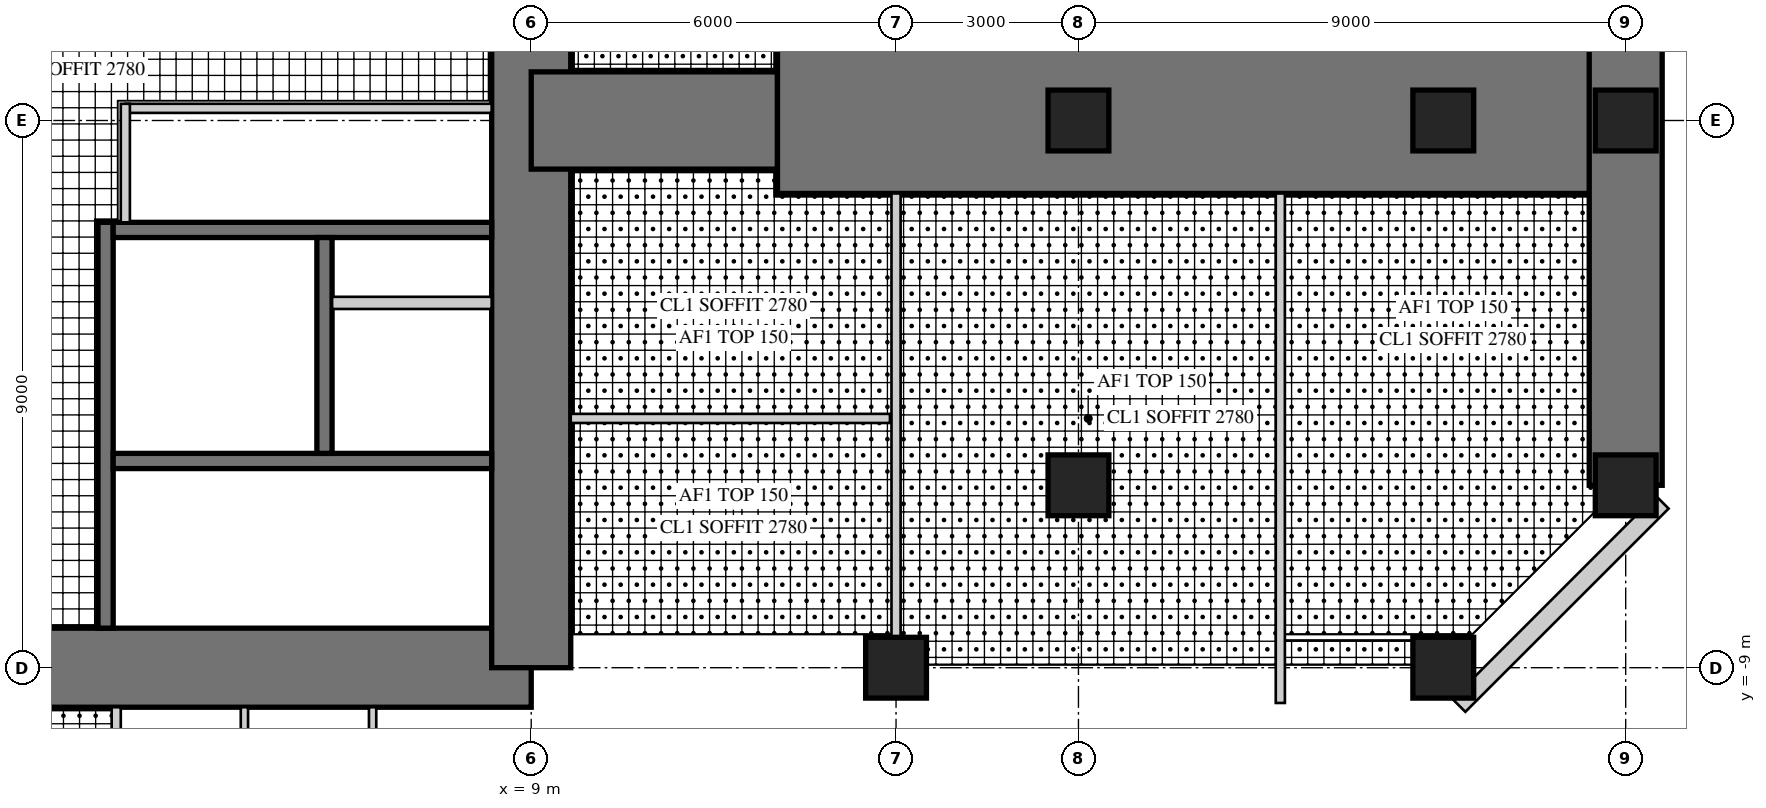
"""IFC4 building model, lengths in metres.
Left out: names, types, materials, properties, quantities, classifications, styles, units other than length and angle.
Written with IfcOpenShell. Run it as: python <this file> out.ifc"""

import sys

from ifc_helpers import new_model, si_unit, direction, frame, frame_2d, origin, origin_2d, place, context, subcontext, project, spatial, rectangle, hollow_rectangle, extrude, element, fill, save


model = new_model("IFC4")
c1 = context("Model", 3, precision=1e-05, world=origin(), true_north=direction((0.0, 1.0)))
c2 = subcontext(c1, "Body", "Model", "MODEL_VIEW")
j1 = project(units=[si_unit("LENGTHUNIT", "METRE"), si_unit("PLANEANGLEUNIT", "RADIAN")], contexts=[c1])
p1 = place(None, origin())
s1 = spatial("IfcSite", under=j1, at=p1, CompositionType="ELEMENT")
p2 = place(p1, origin())
s2 = spatial("IfcBuilding", under=s1, at=p2, CompositionType="ELEMENT")
p3 = place(p2, frame((0.0, 0.0, 152.5)))
s3 = spatial("IfcBuildingStorey", under=s2, at=p3, CompositionType="ELEMENT", Elevation=152.5)
p4 = place(p3, frame((-9.0, -9.0, 0.0), z_axis=(0.0, 0.0, 1.0), x_axis=(1.0, 0.0, 0.0)))
e1 = element("IfcWall", 1, at=p4, inside=s3, PredefinedType="SHEAR", context=c2, shape_type="SweptSolid", body=[
    extrude(rectangle(XDim=18.0, YDim=1.3, at=frame_2d((9.0, 0.0))), origin(), (0.0, 0.0, 1.0), 4.0),
])
p5 = place(p4, frame((9.8, 0.0, 0.0)))
e2 = element("IfcOpeningElement", 2, at=p5, cuts=e1, PredefinedType="OPENING", context=c2, shape_type="SweptSolid", body=[
    extrude(rectangle(XDim=1.0, YDim=2.4, at=frame_2d((0.5, 1.2))), frame((0.0, 0.66, 0.0), z_axis=(0.0, -1.0, 0.0), x_axis=(1.0, 0.0, 0.0)), (0.0, 0.0, 1.0), 1.32),
])
p6 = place(p3, frame((9.0, -9.0, 0.0), z_axis=(0.0, 0.0, 1.0), x_axis=(0.0, 1.0, 0.0)))
e3 = element("IfcWall", 3, at=p6, inside=s3, PredefinedType="SHEAR", context=c2, shape_type="SweptSolid", body=[
    extrude(rectangle(XDim=18.0, YDim=1.3, at=frame_2d((9.0, 0.0))), origin(), (0.0, 0.0, 1.0), 4.0),
])
p7 = place(p6, frame((9.8, 0.0, 0.0)))
e4 = element("IfcOpeningElement", 4, at=p7, cuts=e3, PredefinedType="OPENING", context=c2, shape_type="SweptSolid", body=[
    extrude(rectangle(XDim=1.0, YDim=2.4, at=frame_2d((0.5, 1.2))), frame((0.0, 0.66, 0.0), z_axis=(0.0, -1.0, 0.0), x_axis=(1.0, 0.0, 0.0)), (0.0, 0.0, 1.0), 1.32),
])
p8 = place(p3, frame((2.0, -1.675, 0.0), z_axis=(0.0, 0.0, 1.0), x_axis=(0.0, -1.0, 0.0)))
e5 = element("IfcWall", 5, at=p8, inside=s3, PredefinedType="SHEAR", context=c2, shape_type="SweptSolid", body=[
    extrude(rectangle(XDim=6.675, YDim=0.25, at=frame_2d((3.337, 0.0))), origin(), (0.0, 0.0, 1.0), 4.0),
])
p9 = place(p8, frame((0.725, 0.0, 0.0)))
e6 = element("IfcOpeningElement", 6, at=p9, cuts=e5, PredefinedType="OPENING", context=c2, shape_type="SweptSolid", body=[
    extrude(rectangle(XDim=1.0, YDim=2.1, at=frame_2d((0.5, 1.05))), frame((0.0, 0.135, 0.0), z_axis=(0.0, -1.0, 0.0), x_axis=(1.0, 0.0, 0.0)), (0.0, 0.0, 1.0), 0.27),
])
p10 = place(p3, frame((2.125, -1.8, 0.0), z_axis=(0.0, 0.0, 1.0), x_axis=(1.0, 0.0, 0.0)))
e7 = element("IfcWall", 7, at=p10, inside=s3, PredefinedType="SHEAR", context=c2, shape_type="SweptSolid", body=[
    extrude(rectangle(XDim=6.225, YDim=0.25, at=frame_2d((3.113, 0.0))), origin(), (0.0, 0.0, 1.0), 4.0),
])
p11 = place(p3, frame((2.125, -5.6, 0.0), z_axis=(0.0, 0.0, 1.0), x_axis=(1.0, 0.0, 0.0)))
e8 = element("IfcWall", 8, at=p11, inside=s3, PredefinedType="SHEAR", context=c2, shape_type="SweptSolid", body=[
    extrude(rectangle(XDim=6.225, YDim=0.25, at=frame_2d((3.113, 0.0))), origin(), (0.0, 0.0, 1.0), 4.0),
])
p12 = place(p11, frame((0.175, 0.0, 0.0)))
e9 = element("IfcOpeningElement", 9, at=p12, cuts=e8, PredefinedType="OPENING", context=c2, shape_type="SweptSolid", body=[
    extrude(rectangle(XDim=1.0, YDim=2.1, at=frame_2d((0.5, 1.05))), frame((0.0, 0.135, 0.0), z_axis=(0.0, -1.0, 0.0), x_axis=(1.0, 0.0, 0.0)), (0.0, 0.0, 1.0), 0.27),
])
p13 = place(p3, frame((5.6, -1.925, 0.0), z_axis=(0.0, 0.0, 1.0), x_axis=(0.0, -1.0, 0.0)))
e10 = element("IfcWall", 10, at=p13, inside=s3, PredefinedType="SHEAR", context=c2, shape_type="SweptSolid", body=[
    extrude(rectangle(XDim=3.55, YDim=0.25, at=frame_2d((1.775, 0.0))), origin(), (0.0, 0.0, 1.0), 4.0),
])
p14 = place(p13, frame((1.525, 0.0, 0.0)))
e11 = element("IfcOpeningElement", 11, at=p14, cuts=e10, PredefinedType="OPENING", context=c2, shape_type="SweptSolid", body=[
    extrude(rectangle(XDim=1.1, YDim=2.2, at=frame_2d((0.55, 1.1))), frame((0.0, 0.135, 0.0), z_axis=(0.0, -1.0, 0.0), x_axis=(1.0, 0.0, 0.0)), (0.0, 0.0, 1.0), 0.27),
])
p15 = place(p13, frame((0.075, 0.0, 0.0)))
e12 = element("IfcOpeningElement", 12, at=p15, cuts=e10, PredefinedType="OPENING", context=c2, shape_type="SweptSolid", body=[
    extrude(rectangle(XDim=0.8, YDim=2.1, at=frame_2d((0.4, 1.05))), frame((0.0, 0.135, 0.0), z_axis=(0.0, -1.0, 0.0), x_axis=(1.0, 0.0, 0.0)), (0.0, 0.0, 1.0), 0.27),
])
p16 = place(p3, frame((5.725, -3.0, 0.0), z_axis=(0.0, 0.0, 1.0), x_axis=(1.0, 0.0, 0.0)))
e13 = element("IfcWall", 13, at=p16, inside=s3, PredefinedType="PARTITIONING", context=c2, shape_type="SweptSolid", body=[
    extrude(rectangle(XDim=2.625, YDim=0.2, at=frame_2d((1.312, 0.0))), origin(), (0.0, 0.0, 1.0), 4.0),
])
p17 = place(p3, frame((9.0, 0.0, 0.0), z_axis=(0.0, 0.0, 1.0), x_axis=(1.0, 0.0, 0.0)))
e14 = element("IfcWall", 14, at=p17, inside=s3, PredefinedType="SHEAR", context=c2, shape_type="SweptSolid", body=[
    extrude(rectangle(XDim=4.05, YDim=1.6, at=frame_2d((2.025, 0.0))), origin(), (0.0, 0.0, 1.0), 4.0),
])
p18 = place(p3, frame((13.05, 0.0, 0.0), z_axis=(0.0, 0.0, 1.0), x_axis=(1.0, 0.0, 0.0)))
e15 = element("IfcWall", 15, at=p18, inside=s3, PredefinedType="SHEAR", context=c2, shape_type="SweptSolid", body=[
    extrude(rectangle(XDim=13.95, YDim=2.4, at=frame_2d((6.975, 0.0))), origin(), (0.0, 0.0, 1.0), 4.0),
])
p19 = place(p18, frame((5.75, 0.0, 0.0)))
e16 = element("IfcOpeningElement", 16, at=p19, cuts=e15, PredefinedType="OPENING", context=c2, shape_type="SweptSolid", body=[
    extrude(rectangle(XDim=1.0, YDim=2.2, at=frame_2d((0.5, 1.1))), frame((0.0, 1.21, 0.0), z_axis=(0.0, -1.0, 0.0), x_axis=(1.0, 0.0, 0.0)), (0.0, 0.0, 1.0), 2.42),
])
p20 = place(p3, frame((27.0, -6.0, 0.0), z_axis=(0.0, 0.0, 1.0), x_axis=(0.0, 1.0, 0.0)))
e17 = element("IfcWall", 17, at=p20, inside=s3, PredefinedType="SHEAR", context=c2, shape_type="SweptSolid", body=[
    extrude(rectangle(XDim=12.0, YDim=1.2, at=frame_2d((6.0, 0.0))), origin(), (0.0, 0.0, 1.0), 4.0),
])
p21 = place(p20, frame((1.25, 0.0, 0.6)))
e18 = element("IfcOpeningElement", 18, at=p21, cuts=e17, PredefinedType="OPENING", context=c2, shape_type="SweptSolid", body=[
    extrude(rectangle(XDim=3.0, YDim=2.4, at=frame_2d((1.5, 1.2))), frame((0.0, 0.61, 0.0), z_axis=(0.0, -1.0, 0.0), x_axis=(1.0, 0.0, 0.0)), (0.0, 0.0, 1.0), 1.22),
])
p22 = place(p20, frame((7.75, 0.0, 0.6)))
e19 = element("IfcOpeningElement", 19, at=p22, cuts=e17, PredefinedType="OPENING", context=c2, shape_type="SweptSolid", body=[
    extrude(rectangle(XDim=3.0, YDim=2.4, at=frame_2d((1.5, 1.2))), frame((0.0, 0.61, 0.0), z_axis=(0.0, -1.0, 0.0), x_axis=(1.0, 0.0, 0.0)), (0.0, 0.0, 1.0), 1.22),
])
for number, where, z_axis, x_axis in (
    (20, (15.0, -9.0, 0.0), (0.0, 0.0, 1.0), (1.0, 0.0, 0.0)),
    (21, (24.0, -9.0, 0.0), (0.0, 0.0, 1.0), (1.0, 0.0, 0.0)),
    (22, (27.0, -6.0, 0.0), (0.0, 0.0, 1.0), (1.0, 0.0, 0.0)),
    (23, (27.0, 0.0, 0.0), (0.0, 0.0, 1.0), (1.0, 0.0, 0.0)),
    (24, (18.0, -6.0, 0.0), (0.0, 0.0, 1.0), (1.0, 0.0, 0.0)),
    (25, (18.0, 0.0, 0.0), (0.0, 0.0, 1.0), (1.0, 0.0, 0.0)),
    (26, (24.0, 0.0, 0.0), (0.0, 0.0, 1.0), (1.0, 0.0, 0.0)),
):
    element("IfcColumn", number, at=place(p3, frame(where, z_axis=z_axis, x_axis=x_axis)), inside=s3, PredefinedType="COLUMN", context=c2, shape_type="SweptSolid", body=[
        extrude(rectangle(XDim=1.0, YDim=1.0, at=origin_2d()), origin(), (0.0, 0.0, 1.0), 4.0),
    ])
p23 = place(p3, frame((24.257, -9.62, 0.0), z_axis=(0.0, 0.0, 1.0), x_axis=(0.707106781187, 0.707106781187, 0.0)))
e27 = element("IfcWall", 27, at=p23, inside=s3, PredefinedType="SOLIDWALL", context=c2, shape_type="SweptSolid", body=[
    extrude(rectangle(XDim=4.728, YDim=0.3, at=frame_2d((2.364, 0.0))), origin(), (0.0, 0.0, 1.0), 3.8),
])
p24 = place(p23, frame((1.914, 0.0, 0.3)))
e28 = element("IfcOpeningElement", 28, at=p24, cuts=e27, PredefinedType="OPENING", context=c2, shape_type="SweptSolid", body=[
    extrude(rectangle(XDim=0.9, YDim=2.4, at=frame_2d((0.45, 1.2))), frame((0.0, 0.16, 0.0), z_axis=(0.0, -1.0, 0.0), x_axis=(1.0, 0.0, 0.0)), (0.0, 0.0, 1.0), 0.32),
])
p25 = place(p3, frame((2.325, 0.2, 0.0), z_axis=(0.0, 0.0, 1.0), x_axis=(1.0, 0.0, 0.0)))
e29 = element("IfcWall", 29, at=p25, inside=s3, PredefinedType="PARTITIONING", context=c2, shape_type="SweptSolid", body=[
    extrude(rectangle(XDim=6.025, YDim=0.15, at=frame_2d((3.013, 0.0))), origin(), (0.0, 0.0, 1.0), 3.8),
])
p26 = place(p25, frame((0.4, 0.0, 0.0)))
e30 = element("IfcOpeningElement", 30, at=p26, cuts=e29, PredefinedType="OPENING", context=c2, shape_type="SweptSolid", body=[
    extrude(rectangle(XDim=1.0, YDim=2.1, at=frame_2d((0.5, 1.05))), frame((0.0, 0.085, 0.0), z_axis=(0.0, -1.0, 0.0), x_axis=(1.0, 0.0, 0.0)), (0.0, 0.0, 1.0), 0.17),
])
p27 = place(p3, frame((2.325, -1.675, 0.0), z_axis=(0.0, 0.0, 1.0), x_axis=(0.0, 1.0, 0.0)))
e31 = element("IfcWall", 31, at=p27, inside=s3, PredefinedType="PARTITIONING", context=c2, shape_type="SweptSolid", body=[
    extrude(rectangle(XDim=1.95, YDim=0.15, at=frame_2d((0.975, 0.0))), origin(), (0.0, 0.0, 1.0), 3.8),
])
p28 = place(p3, frame((15.0, -8.5, 0.0), z_axis=(0.0, 0.0, 1.0), x_axis=(0.0, 1.0, 0.0)))
e32 = element("IfcWall", 32, at=p28, inside=s3, PredefinedType="PARTITIONING", context=c2, shape_type="SweptSolid", body=[
    extrude(rectangle(XDim=7.3, YDim=0.15, at=frame_2d((3.65, 0.0))), origin(), (0.0, 0.0, 1.0), 3.0),
])
p29 = place(p28, frame((1.3, 0.0, 0.0)))
e33 = element("IfcOpeningElement", 33, at=p29, cuts=e32, PredefinedType="OPENING", context=c2, shape_type="SweptSolid", body=[
    extrude(rectangle(XDim=1.0, YDim=2.1, at=frame_2d((0.5, 1.05))), frame((0.0, 0.085, 0.0), z_axis=(0.0, -1.0, 0.0), x_axis=(1.0, 0.0, 0.0)), (0.0, 0.0, 1.0), 0.17),
])
p30 = place(p28, frame((4.95, 0.0, 0.0)))
e34 = element("IfcOpeningElement", 34, at=p30, cuts=e32, PredefinedType="OPENING", context=c2, shape_type="SweptSolid", body=[
    extrude(rectangle(XDim=1.0, YDim=2.1, at=frame_2d((0.5, 1.05))), frame((0.0, 0.085, 0.0), z_axis=(0.0, -1.0, 0.0), x_axis=(1.0, 0.0, 0.0)), (0.0, 0.0, 1.0), 0.17),
])
p31 = place(p3, frame((9.65, -4.9, 0.0), z_axis=(0.0, 0.0, 1.0), x_axis=(1.0, 0.0, 0.0)))
e35 = element("IfcWall", 35, at=p31, inside=s3, PredefinedType="PARTITIONING", context=c2, shape_type="SweptSolid", body=[
    extrude(rectangle(XDim=5.25, YDim=0.15, at=frame_2d((2.625, 0.0))), origin(), (0.0, 0.0, 1.0), 3.8),
])
p32 = place(p3, frame((21.32, -9.58, 0.0), z_axis=(0.0, 0.0, 1.0), x_axis=(0.0, 1.0, 0.0)))
e36 = element("IfcWall", 36, at=p32, inside=s3, PredefinedType="PARTITIONING", context=c2, shape_type="SweptSolid", body=[
    extrude(rectangle(XDim=8.38, YDim=0.15, at=frame_2d((4.19, 0.0))), origin(), (0.0, 0.0, 1.0), 3.8),
])
p33 = place(p32, frame((6.93, 0.0, 0.0)))
e37 = element("IfcOpeningElement", 37, at=p33, cuts=e36, PredefinedType="OPENING", context=c2, shape_type="SweptSolid", body=[
    extrude(rectangle(XDim=1.0, YDim=2.2, at=frame_2d((0.5, 1.1))), frame((0.0, 0.085, 0.0), z_axis=(0.0, -1.0, 0.0), x_axis=(1.0, 0.0, 0.0)), (0.0, 0.0, 1.0), 0.17),
])
p34 = place(p3, frame((2.175, -9.65, 0.0), z_axis=(0.0, 0.0, 1.0), x_axis=(0.0, -1.0, 0.0)))
e38 = element("IfcWall", 38, at=p34, inside=s3, PredefinedType="PARTITIONING", context=c2, shape_type="SweptSolid", body=[
    extrude(rectangle(XDim=5.35, YDim=0.15, at=frame_2d((2.675, 0.0))), origin(), (0.0, 0.0, 1.0), 3.8),
])
for number, where, z_axis, x_axis in (
    (39, (4.283, -9.65, 0.0), (0.0, 0.0, 1.0), (0.0, -1.0, 0.0)),
    (40, (6.392, -9.65, 0.0), (0.0, 0.0, 1.0), (0.0, -1.0, 0.0)),
):
    element("IfcWall", number, at=place(p3, frame(where, z_axis=z_axis, x_axis=x_axis)), inside=s3, PredefinedType="PLUMBINGWALL", context=c2, shape_type="SweptSolid", body=[
        extrude(rectangle(XDim=5.25, YDim=0.12, at=frame_2d((2.625, 0.0))), origin(), (0.0, 0.0, 1.0), 3.8),
    ])
p35 = place(p24, origin())
e41 = element("IfcWindow", 41, at=p35, inside=s3, PartitioningType="SINGLE_PANEL", PredefinedType="WINDOW", context=c2, shape_type="SweptSolid", body=[
    extrude(hollow_rectangle(XDim=0.9, YDim=2.4, WallThickness=0.06, at=frame_2d((0.45, 1.2))), frame((0.0, 0.03, 0.0), z_axis=(0.0, -1.0, 0.0), x_axis=(1.0, 0.0, 0.0)), (0.0, 0.0, 1.0), 0.06),
    extrude(rectangle(XDim=0.779, YDim=2.279, at=frame_2d((0.45, 1.2))), frame((0.0, 0.03, 0.0), z_axis=(0.0, -1.0, 0.0), x_axis=(1.0, 0.0, 0.0)), (0.0, 0.0, 1.0), 0.06),
])
fill(e28, e41)
p36 = place(p21, origin())
e42 = element("IfcWindow", 42, at=p36, inside=s3, PartitioningType="SINGLE_PANEL", PredefinedType="WINDOW", context=c2, shape_type="SweptSolid", body=[
    extrude(hollow_rectangle(XDim=3.0, YDim=2.4, WallThickness=0.06, at=frame_2d((1.5, 1.2))), frame((0.0, 0.03, 0.0), z_axis=(0.0, -1.0, 0.0), x_axis=(1.0, 0.0, 0.0)), (0.0, 0.0, 1.0), 0.06),
    extrude(rectangle(XDim=2.879, YDim=2.279, at=frame_2d((1.5, 1.2))), frame((0.0, 0.03, 0.0), z_axis=(0.0, -1.0, 0.0), x_axis=(1.0, 0.0, 0.0)), (0.0, 0.0, 1.0), 0.06),
])
fill(e18, e42)
p37 = place(p26, frame((1.0, 0.0, 0.0), z_axis=(0.0, 0.0, 1.0), x_axis=(-1.0, 0.0, 0.0)))
e43 = element("IfcDoor", 43, at=p37, inside=s3, OperationType="SINGLE_SWING_RIGHT", PredefinedType="DOOR", context=c2, shape_type="SweptSolid", body=[
    extrude(rectangle(XDim=1.0, YDim=2.1, at=frame_2d((0.5, 1.05))), frame((0.0, 0.025, 0.0), z_axis=(0.0, -1.0, 0.0), x_axis=(1.0, 0.0, 0.0)), (0.0, 0.0, 1.0), 0.05),
])
fill(e30, e43)
p38 = place(p29, origin())
e44 = element("IfcDoor", 44, at=p38, inside=s3, OperationType="SINGLE_SWING_RIGHT", PredefinedType="DOOR", context=c2, shape_type="SweptSolid", body=[
    extrude(rectangle(XDim=1.0, YDim=2.1, at=frame_2d((0.5, 1.05))), frame((0.0, 0.025, 0.0), z_axis=(0.0, -1.0, 0.0), x_axis=(1.0, 0.0, 0.0)), (0.0, 0.0, 1.0), 0.05),
])
fill(e33, e44)
p39 = place(p30, origin())
e45 = element("IfcDoor", 45, at=p39, inside=s3, OperationType="SINGLE_SWING_LEFT", PredefinedType="DOOR", context=c2, shape_type="SweptSolid", body=[
    extrude(rectangle(XDim=1.0, YDim=2.1, at=frame_2d((0.5, 1.05))), frame((0.0, 0.025, 0.0), z_axis=(0.0, -1.0, 0.0), x_axis=(1.0, 0.0, 0.0)), (0.0, 0.0, 1.0), 0.05),
])
fill(e34, e45)
p40 = place(p33, frame((1.0, 0.0, 0.0), z_axis=(0.0, 0.0, 1.0), x_axis=(-1.0, 0.0, 0.0)))
e46 = element("IfcDoor", 46, at=p40, inside=s3, OperationType="SINGLE_SWING_LEFT", PredefinedType="DOOR", context=c2, shape_type="SweptSolid", body=[
    extrude(rectangle(XDim=1.0, YDim=2.2, at=frame_2d((0.5, 1.1))), frame((0.0, 0.025, 0.0), z_axis=(0.0, -1.0, 0.0), x_axis=(1.0, 0.0, 0.0)), (0.0, 0.0, 1.0), 0.05),
])
fill(e37, e46)
p41 = place(p19, frame((1.0, 0.0, 0.0), z_axis=(0.0, 0.0, 1.0), x_axis=(-1.0, 0.0, 0.0)))
e47 = element("IfcDoor", 47, at=p41, inside=s3, OperationType="SINGLE_SWING_LEFT", PredefinedType="DOOR", context=c2, shape_type="SweptSolid", body=[
    extrude(rectangle(XDim=1.0, YDim=2.2, at=frame_2d((0.5, 1.1))), frame((0.0, 0.025, 0.0), z_axis=(0.0, -1.0, 0.0), x_axis=(1.0, 0.0, 0.0)), (0.0, 0.0, 1.0), 0.05),
])
fill(e16, e47)
p42 = place(p5, frame((1.0, 0.0, 0.0), z_axis=(0.0, 0.0, 1.0), x_axis=(-1.0, 0.0, 0.0)))
e48 = element("IfcDoor", 48, at=p42, inside=s3, OperationType="SINGLE_SWING_RIGHT", PredefinedType="DOOR", context=c2, shape_type="SweptSolid", body=[
    extrude(rectangle(XDim=1.0, YDim=2.4, at=frame_2d((0.5, 1.2))), frame((0.0, -0.005, 0.0), z_axis=(0.0, -1.0, 0.0), x_axis=(1.0, 0.0, 0.0)), (0.0, 0.0, 1.0), 0.05),
])
fill(e2, e48)
p43 = place(p7, frame((1.0, 0.0, 0.0), z_axis=(0.0, 0.0, 1.0), x_axis=(-1.0, 0.0, 0.0)))
e49 = element("IfcDoor", 49, at=p43, inside=s3, OperationType="SINGLE_SWING_RIGHT", PredefinedType="DOOR", context=c2, shape_type="SweptSolid", body=[
    extrude(rectangle(XDim=1.0, YDim=2.4, at=frame_2d((0.5, 1.2))), frame((0.0, -0.005, 0.0), z_axis=(0.0, -1.0, 0.0), x_axis=(1.0, 0.0, 0.0)), (0.0, 0.0, 1.0), 0.05),
])
fill(e4, e49)
p44 = place(p9, origin())
e50 = element("IfcDoor", 50, at=p44, inside=s3, OperationType="SINGLE_SWING_LEFT", PredefinedType="DOOR", context=c2, shape_type="SweptSolid", body=[
    extrude(rectangle(XDim=1.0, YDim=2.1, at=frame_2d((0.5, 1.05))), frame((0.0, 0.025, 0.0), z_axis=(0.0, -1.0, 0.0), x_axis=(1.0, 0.0, 0.0)), (0.0, 0.0, 1.0), 0.05),
])
fill(e6, e50)
p45 = place(p12, frame((1.0, 0.0, 0.0), z_axis=(0.0, 0.0, 1.0), x_axis=(-1.0, 0.0, 0.0)))
e51 = element("IfcDoor", 51, at=p45, inside=s3, OperationType="SINGLE_SWING_RIGHT", PredefinedType="DOOR", context=c2, shape_type="SweptSolid", body=[
    extrude(rectangle(XDim=1.0, YDim=2.1, at=frame_2d((0.5, 1.05))), frame((0.0, 0.025, 0.0), z_axis=(0.0, -1.0, 0.0), x_axis=(1.0, 0.0, 0.0)), (0.0, 0.0, 1.0), 0.05),
])
fill(e9, e51)
p46 = place(p14, origin())
e52 = element("IfcDoor", 52, at=p46, inside=s3, OperationType="DOUBLE_DOOR_SLIDING", PredefinedType="DOOR", context=c2, shape_type="SweptSolid", body=[
    extrude(rectangle(XDim=1.1, YDim=2.2, at=frame_2d((0.55, 1.1))), frame((0.0, 0.025, 0.0), z_axis=(0.0, -1.0, 0.0), x_axis=(1.0, 0.0, 0.0)), (0.0, 0.0, 1.0), 0.05),
])
fill(e11, e52)
p47 = place(p15, origin())
e53 = element("IfcDoor", 53, at=p47, inside=s3, OperationType="SINGLE_SWING_LEFT", PredefinedType="DOOR", context=c2, shape_type="SweptSolid", body=[
    extrude(rectangle(XDim=0.8, YDim=2.1, at=frame_2d((0.4, 1.05))), frame((0.0, 0.025, 0.0), z_axis=(0.0, -1.0, 0.0), x_axis=(1.0, 0.0, 0.0)), (0.0, 0.0, 1.0), 0.05),
])
fill(e12, e53)
save(model, sys.argv[1])
